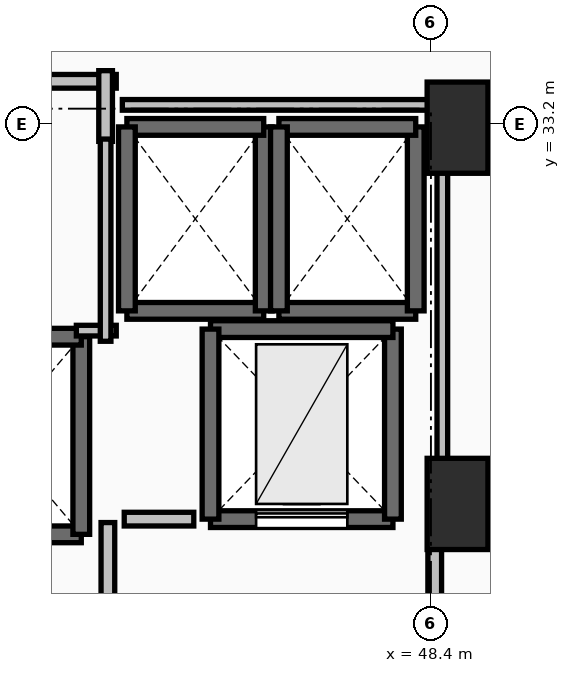
"""IFC4 building model, lengths in metres.
Left out: names, types, materials, properties, quantities, classifications, styles, units other than length and angle.
Written with IfcOpenShell. Run it as: python <this file> out.ifc"""

import sys

from ifc_helpers import new_model, si_unit, direction, frame, frame_2d, origin, origin_2d, place, context, subcontext, project, spatial, rectangle, extrude, element, fill, save


model = new_model("IFC4")
c1 = context("Model", 3, precision=1e-05, world=origin(), true_north=direction((0.0, 1.0)))
c2 = subcontext(c1, "Body", "Model", "MODEL_VIEW")
j1 = project(units=[si_unit("LENGTHUNIT", "METRE"), si_unit("PLANEANGLEUNIT", "RADIAN")], contexts=[c1])
p1 = place(None, origin())
s1 = spatial("IfcSite", under=j1, at=p1, CompositionType="ELEMENT")
p2 = place(p1, origin())
s2 = spatial("IfcBuilding", under=s1, at=p2, CompositionType="ELEMENT")
p3 = place(p2, frame((0.0, 0.0, 62.5)))
s3 = spatial("IfcBuildingStorey", under=s2, at=p3, CompositionType="ELEMENT", Elevation=62.5)
for number, where, z_axis, x_axis in (
    (1, (48.75, 33.15, 0.0), (0.0, 0.0, 1.0), (1.0, 0.0, 0.0)),
    (2, (48.75, 28.2, 0.0), (0.0, 0.0, 1.0), (1.0, 0.0, 0.0)),
):
    element("IfcColumn", number, at=place(p3, frame(where, z_axis=z_axis, x_axis=x_axis)), inside=s3, PredefinedType="PILASTER", context=c2, shape_type="SweptSolid", body=[
        extrude(rectangle(XDim=0.8, YDim=1.2, at=origin_2d()), origin(), (0.0, 0.0, 1.0), 3.5),
    ])
p4 = place(p3, frame((41.6, 27.8, 0.0), z_axis=(0.0, 0.0, 1.0), x_axis=(1.0, 0.0, 0.0)))
e3 = element("IfcWall", 3, at=p4, inside=s3, PredefinedType="SOLIDWALL", context=c2, shape_type="SweptSolid", body=[
    extrude(rectangle(XDim=2.2, YDim=0.22, at=frame_2d((1.1, 0.0))), origin(), (0.0, 0.0, 1.0), 3.24),
])
p5 = place(p3, frame((43.8, 27.8, 0.0), z_axis=(0.0, 0.0, 1.0), x_axis=(0.0, 1.0, 0.0)))
e4 = element("IfcWall", 4, at=p5, inside=s3, PredefinedType="SOLIDWALL", context=c2, shape_type="SweptSolid", body=[
    extrude(rectangle(XDim=2.6, YDim=0.22, at=frame_2d((1.3, 0.0))), origin(), (0.0, 0.0, 1.0), 3.24),
])
p6 = place(p3, frame((43.8, 30.4, 0.0), z_axis=(0.0, 0.0, 1.0), x_axis=(-1.0, 0.0, 0.0)))
e5 = element("IfcWall", 5, at=p6, inside=s3, PredefinedType="SOLIDWALL", context=c2, shape_type="SweptSolid", body=[
    extrude(rectangle(XDim=2.2, YDim=0.22, at=frame_2d((1.1, 0.0))), origin(), (0.0, 0.0, 1.0), 3.24),
])
p7 = place(p3, frame((44.4, 30.74, 0.0), z_axis=(0.0, 0.0, 1.0), x_axis=(1.0, 0.0, 0.0)))
e6 = element("IfcWall", 6, at=p7, inside=s3, PredefinedType="SOLIDWALL", context=c2, shape_type="SweptSolid", body=[
    extrude(rectangle(XDim=1.8, YDim=0.22, at=frame_2d((0.9, 0.0))), origin(), (0.0, 0.0, 1.0), 3.24),
])
p8 = place(p3, frame((46.2, 30.74, 0.0), z_axis=(0.0, 0.0, 1.0), x_axis=(0.0, 1.0, 0.0)))
e7 = element("IfcWall", 7, at=p8, inside=s3, PredefinedType="SOLIDWALL", context=c2, shape_type="SweptSolid", body=[
    extrude(rectangle(XDim=2.42, YDim=0.22, at=frame_2d((1.21, 0.0))), origin(), (0.0, 0.0, 1.0), 3.24),
])
p9 = place(p3, frame((46.2, 33.16, 0.0), z_axis=(0.0, 0.0, 1.0), x_axis=(-1.0, 0.0, 0.0)))
e8 = element("IfcWall", 8, at=p9, inside=s3, PredefinedType="SOLIDWALL", context=c2, shape_type="SweptSolid", body=[
    extrude(rectangle(XDim=1.8, YDim=0.22, at=frame_2d((0.9, 0.0))), origin(), (0.0, 0.0, 1.0), 3.24),
])
p10 = place(p3, frame((44.4, 33.16, 0.0), z_axis=(0.0, 0.0, 1.0), x_axis=(0.0, -1.0, 0.0)))
e9 = element("IfcWall", 9, at=p10, inside=s3, PredefinedType="SOLIDWALL", context=c2, shape_type="SweptSolid", body=[
    extrude(rectangle(XDim=2.42, YDim=0.22, at=frame_2d((1.21, 0.0))), origin(), (0.0, 0.0, 1.0), 3.24),
])
p11 = place(p3, frame((46.4, 30.74, 0.0), z_axis=(0.0, 0.0, 1.0), x_axis=(1.0, 0.0, 0.0)))
e10 = element("IfcWall", 10, at=p11, inside=s3, PredefinedType="SOLIDWALL", context=c2, shape_type="SweptSolid", body=[
    extrude(rectangle(XDim=1.8, YDim=0.22, at=frame_2d((0.9, 0.0))), origin(), (0.0, 0.0, 1.0), 3.24),
])
p12 = place(p3, frame((48.2, 30.74, 0.0), z_axis=(0.0, 0.0, 1.0), x_axis=(0.0, 1.0, 0.0)))
e11 = element("IfcWall", 11, at=p12, inside=s3, PredefinedType="SOLIDWALL", context=c2, shape_type="SweptSolid", body=[
    extrude(rectangle(XDim=2.42, YDim=0.22, at=frame_2d((1.21, 0.0))), origin(), (0.0, 0.0, 1.0), 3.24),
])
p13 = place(p3, frame((48.2, 33.16, 0.0), z_axis=(0.0, 0.0, 1.0), x_axis=(-1.0, 0.0, 0.0)))
e12 = element("IfcWall", 12, at=p13, inside=s3, PredefinedType="SOLIDWALL", context=c2, shape_type="SweptSolid", body=[
    extrude(rectangle(XDim=1.8, YDim=0.22, at=frame_2d((0.9, 0.0))), origin(), (0.0, 0.0, 1.0), 3.24),
])
p14 = place(p3, frame((46.4, 33.16, 0.0), z_axis=(0.0, 0.0, 1.0), x_axis=(0.0, -1.0, 0.0)))
e13 = element("IfcWall", 13, at=p14, inside=s3, PredefinedType="SOLIDWALL", context=c2, shape_type="SweptSolid", body=[
    extrude(rectangle(XDim=2.42, YDim=0.22, at=frame_2d((1.21, 0.0))), origin(), (0.0, 0.0, 1.0), 3.24),
])
p15 = place(p3, frame((45.5, 28.0, 0.0), z_axis=(0.0, 0.0, 1.0), x_axis=(1.0, 0.0, 0.0)))
e14 = element("IfcWall", 14, at=p15, inside=s3, PredefinedType="SHEAR", context=c2, shape_type="SweptSolid", body=[
    extrude(rectangle(XDim=2.4, YDim=0.22, at=frame_2d((1.2, 0.0))), origin(), (0.0, 0.0, 1.0), 3.24),
])
p16 = place(p15, frame((0.6, 0.0, 0.0)))
e15 = element("IfcOpeningElement", 15, at=p16, cuts=e14, PredefinedType="OPENING", context=c2, shape_type="SweptSolid", body=[
    extrude(rectangle(XDim=1.2, YDim=2.2, at=frame_2d((0.6, 1.1))), frame((0.0, 0.125, 0.0), z_axis=(0.0, -1.0, 0.0), x_axis=(1.0, 0.0, 0.0)), (0.0, 0.0, 1.0), 0.25),
])
p17 = place(p3, frame((47.9, 28.0, 0.0), z_axis=(0.0, 0.0, 1.0), x_axis=(0.0, 1.0, 0.0)))
e16 = element("IfcWall", 16, at=p17, inside=s3, PredefinedType="SHEAR", context=c2, shape_type="SweptSolid", body=[
    extrude(rectangle(XDim=2.5, YDim=0.22, at=frame_2d((1.25, 0.0))), origin(), (0.0, 0.0, 1.0), 3.24),
])
p18 = place(p3, frame((47.9, 30.5, 0.0), z_axis=(0.0, 0.0, 1.0), x_axis=(-1.0, 0.0, 0.0)))
e17 = element("IfcWall", 17, at=p18, inside=s3, PredefinedType="SHEAR", context=c2, shape_type="SweptSolid", body=[
    extrude(rectangle(XDim=2.4, YDim=0.22, at=frame_2d((1.2, 0.0))), origin(), (0.0, 0.0, 1.0), 3.24),
])
p19 = place(p3, frame((45.5, 30.5, 0.0), z_axis=(0.0, 0.0, 1.0), x_axis=(0.0, -1.0, 0.0)))
e18 = element("IfcWall", 18, at=p19, inside=s3, PredefinedType="SHEAR", context=c2, shape_type="SweptSolid", body=[
    extrude(rectangle(XDim=2.5, YDim=0.22, at=frame_2d((1.25, 0.0))), origin(), (0.0, 0.0, 1.0), 3.24),
])
p20 = place(p3, frame((44.15, 27.955, 0.0), z_axis=(0.0, 0.0, 1.0), x_axis=(0.0, -1.0, 0.0)))
e19 = element("IfcWall", 19, at=p20, inside=s3, PredefinedType="PARTITIONING", context=c2, shape_type="SweptSolid", body=[
    extrude(rectangle(XDim=3.91, YDim=0.18, at=frame_2d((1.955, 0.0))), origin(), (0.0, 0.0, 1.0), 3.24),
])
p21 = place(p20, frame((1.355, 0.0, 0.0)))
e20 = element("IfcOpeningElement", 20, at=p21, cuts=e19, PredefinedType="OPENING", context=c2, shape_type="SweptSolid", body=[
    extrude(rectangle(XDim=1.2, YDim=2.15, at=frame_2d((0.6, 1.075))), frame((0.0, 0.105, 0.0), z_axis=(0.0, -1.0, 0.0), x_axis=(1.0, 0.0, 0.0)), (0.0, 0.0, 1.0), 0.21),
])
p22 = place(p3, frame((48.45, 23.95, 0.0), z_axis=(0.0, 0.0, 1.0), x_axis=(0.0, 1.0, 0.0)))
e21 = element("IfcWall", 21, at=p22, inside=s3, PredefinedType="PARTITIONING", context=c2, shape_type="SweptSolid", body=[
    extrude(rectangle(XDim=4.05, YDim=0.18, at=frame_2d((2.025, 0.0))), origin(), (0.0, 0.0, 1.0), 3.24),
])
p23 = place(p22, frame((1.425, 0.0, 0.0)))
e22 = element("IfcOpeningElement", 22, at=p23, cuts=e21, PredefinedType="OPENING", context=c2, shape_type="SweptSolid", body=[
    extrude(rectangle(XDim=1.2, YDim=2.15, at=frame_2d((0.6, 1.075))), frame((0.0, 0.105, 0.0), z_axis=(0.0, -1.0, 0.0), x_axis=(1.0, 0.0, 0.0)), (0.0, 0.0, 1.0), 0.21),
])
p24 = place(p3, frame((44.26, 33.76, 0.0), z_axis=(0.0, 0.0, 1.0), x_axis=(-1.0, 0.0, 0.0)))
e23 = element("IfcWall", 23, at=p24, inside=s3, PredefinedType="PARTITIONING", context=c2, shape_type="SweptSolid", body=[
    extrude(rectangle(XDim=6.91, YDim=0.18, at=frame_2d((3.455, 0.0))), origin(), (0.0, 0.0, 1.0), 3.24),
])
p25 = place(p24, frame((3.03, 0.0, 0.0)))
e24 = element("IfcOpeningElement", 24, at=p25, cuts=e23, PredefinedType="OPENING", context=c2, shape_type="SweptSolid", body=[
    extrude(rectangle(XDim=0.85, YDim=2.1, at=frame_2d((0.425, 1.05))), frame((0.0, 0.105, 0.0), z_axis=(0.0, -1.0, 0.0), x_axis=(1.0, 0.0, 0.0)), (0.0, 0.0, 1.0), 0.21),
])
p26 = place(p3, frame((44.12, 32.97, 0.0), z_axis=(0.0, 0.0, 1.0), x_axis=(0.0, 1.0, 0.0)))
e25 = element("IfcWall", 25, at=p26, inside=s3, PredefinedType="PARTITIONING", context=c2, shape_type="SweptSolid", body=[
    extrude(rectangle(XDim=0.93, YDim=0.18, at=frame_2d((0.465, 0.0))), origin(), (0.0, 0.0, 1.0), 3.24),
])
p27 = place(p3, frame((45.28, 28.0, 0.0), z_axis=(0.0, 0.0, 1.0), x_axis=(-1.0, 0.0, 0.0)))
e26 = element("IfcWall", 26, at=p27, inside=s3, PredefinedType="PARTITIONING", context=c2, shape_type="SweptSolid", body=[
    extrude(rectangle(XDim=0.915, YDim=0.18, at=frame_2d((0.458, 0.0))), origin(), (0.0, 0.0, 1.0), 3.24),
])
p28 = place(p3, frame((43.735, 30.48, 0.0), z_axis=(0.0, 0.0, 1.0), x_axis=(1.0, 0.0, 0.0)))
e27 = element("IfcWall", 27, at=p28, inside=s3, PredefinedType="PARTITIONING", context=c2, shape_type="SweptSolid", body=[
    extrude(rectangle(XDim=0.525, YDim=0.14, at=frame_2d((0.262, 0.0))), origin(), (0.0, 0.0, 1.0), 3.24),
])
p29 = place(p3, frame((44.12, 30.34, 0.0), z_axis=(0.0, 0.0, 1.0), x_axis=(0.0, 1.0, 0.0)))
e28 = element("IfcWall", 28, at=p29, inside=s3, PredefinedType="PARTITIONING", context=c2, shape_type="SweptSolid", body=[
    extrude(rectangle(XDim=2.66, YDim=0.14, at=frame_2d((1.33, 0.0))), origin(), (0.0, 0.0, 1.0), 3.24),
])
p30 = place(p3, frame((44.34, 33.45, 0.0), z_axis=(0.0, 0.0, 1.0), x_axis=(1.0, 0.0, 0.0)))
e29 = element("IfcWall", 29, at=p30, inside=s3, PredefinedType="PARTITIONING", context=c2, shape_type="SweptSolid", body=[
    extrude(rectangle(XDim=4.21, YDim=0.14, at=frame_2d((2.105, 0.0))), origin(), (0.0, 0.0, 1.0), 2.432),
])
p31 = place(p3, frame((48.55, 33.45, 0.0), z_axis=(0.0, 0.0, 1.0), x_axis=(0.0, -1.0, 0.0)))
e30 = element("IfcWall", 30, at=p31, inside=s3, PredefinedType="PARTITIONING", context=c2, shape_type="SweptSolid", body=[
    extrude(rectangle(XDim=5.254, YDim=0.14, at=frame_2d((2.627, 0.0))), origin(), (0.0, 0.0, 1.0), 2.432),
])
p32 = place(p16, origin())
e31 = element("IfcDoor", 31, at=p32, inside=s3, OperationType="SLIDING_TO_LEFT", PredefinedType="DOOR", context=c2, shape_type="SweptSolid", body=[
    extrude(rectangle(XDim=1.2, YDim=2.2, at=frame_2d((0.6, 1.1))), frame((0.0, 0.025, 0.0), z_axis=(0.0, -1.0, 0.0), x_axis=(1.0, 0.0, 0.0)), (0.0, 0.0, 1.0), 0.05),
])
fill(e15, e31)
save(model, sys.argv[1])
